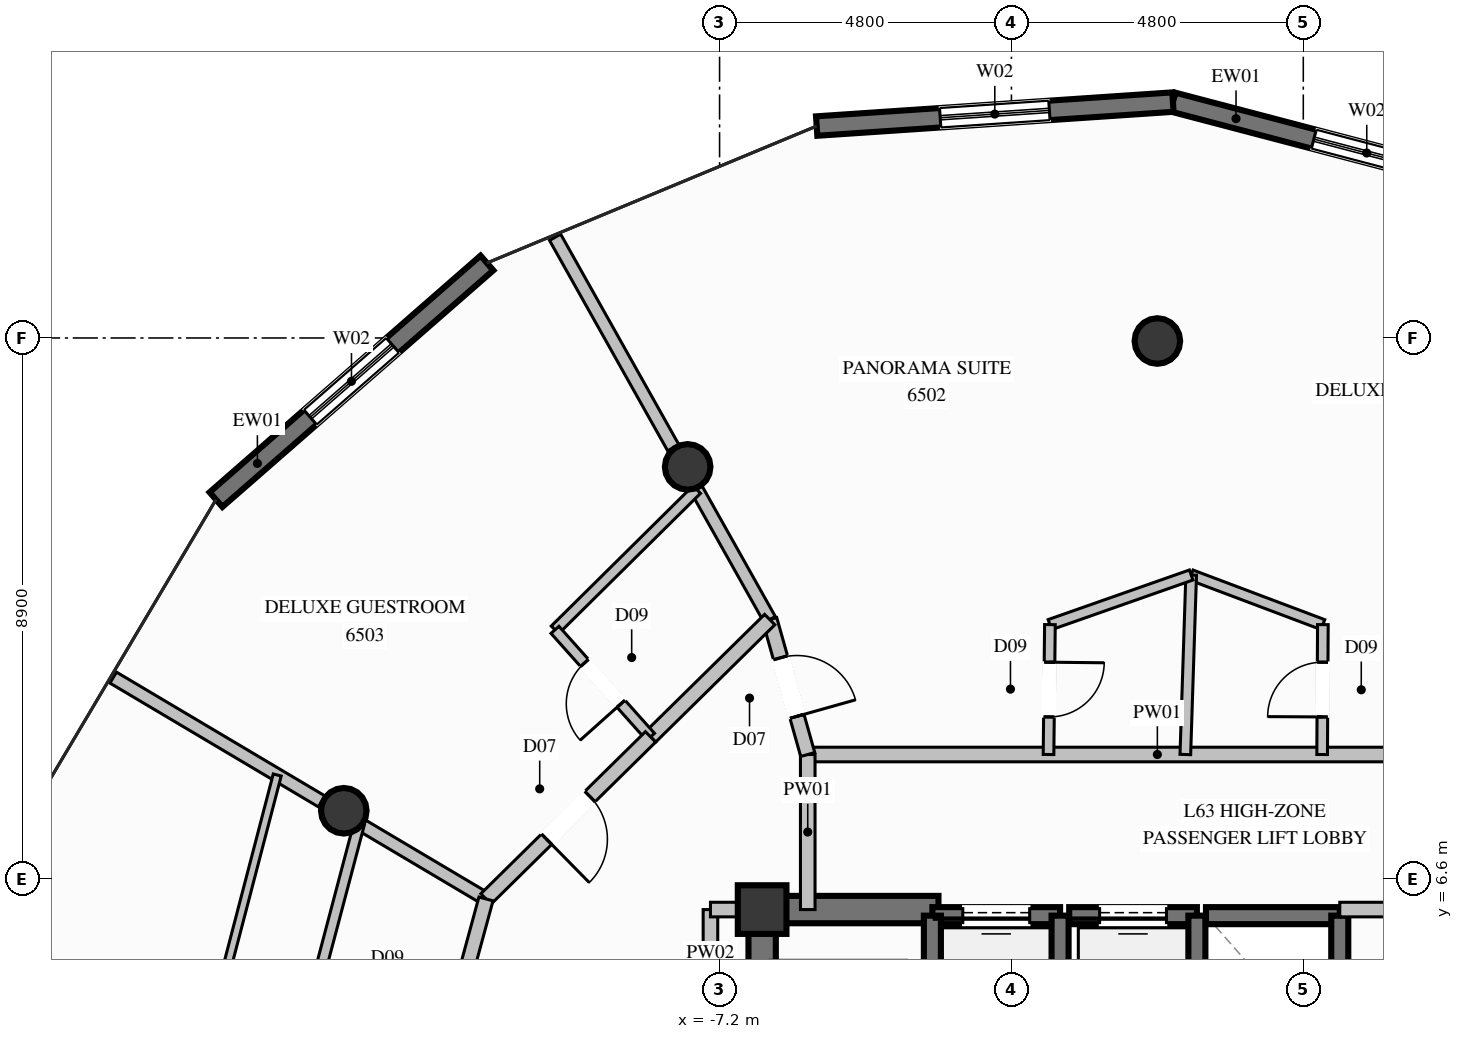
"""IFC4 building model, lengths in metres.
Left out: names, types, materials, properties, quantities, classifications, styles, units other than length and angle.
Written with IfcOpenShell. Run it as: python <this file> out.ifc"""

import sys

from ifc_helpers import new_model, si_unit, direction, frame, frame_2d, origin, origin_2d, place, context, subcontext, project, spatial, rectangle, circle, extrude, element, fill, save


model = new_model("IFC4")
c1 = context("Model", 3, precision=1e-05, world=origin(), true_north=direction((0.0, 1.0)))
c2 = subcontext(c1, "Body", "Model", "MODEL_VIEW")
j1 = project(units=[si_unit("LENGTHUNIT", "METRE"), si_unit("PLANEANGLEUNIT", "RADIAN")], contexts=[c1])
p1 = place(None, origin())
s1 = spatial("IfcSite", under=j1, at=p1, CompositionType="ELEMENT")
p2 = place(p1, origin())
s2 = spatial("IfcBuilding", under=s1, at=p2, CompositionType="ELEMENT")
p3 = place(p2, frame((0.0, 0.0, 243.0)))
s3 = spatial("IfcBuildingStorey", under=s2, at=p3, CompositionType="ELEMENT", Elevation=243.0)
p4 = place(p3, frame((-6.5, 6.1, 0.0), z_axis=(0.0, 0.0, 1.0), x_axis=(1.0, 0.0, 0.0)))
e1 = element("IfcColumn", 1, at=p4, inside=s3, PredefinedType="COLUMN", context=c2, shape_type="SweptSolid", body=[
    extrude(rectangle(XDim=0.8, YDim=0.8, at=origin_2d()), origin(), (0.0, 0.0, 1.0), 3.8),
])
p5 = place(p3, frame((-6.275, 6.1, 0.0), z_axis=(0.0, 0.0, 1.0), x_axis=(1.0, 0.0, 0.0)))
e2 = element("IfcWall", 2, at=p5, inside=s3, PredefinedType="SHEAR", context=c2, shape_type="SweptSolid", body=[
    extrude(rectangle(XDim=2.675, YDim=0.45, at=frame_2d((1.337, 0.0))), origin(), (0.0, 0.0, 1.0), 3.8),
])
p6 = place(p3, frame((-6.5, 2.35, 0.0), z_axis=(0.0, 0.0, 1.0), x_axis=(0.0, 1.0, 0.0)))
e3 = element("IfcWall", 3, at=p6, inside=s3, PredefinedType="SHEAR", context=c2, shape_type="SweptSolid", body=[
    extrude(rectangle(XDim=3.975, YDim=0.45, at=frame_2d((1.987, 0.0))), origin(), (0.0, 0.0, 1.0), 3.8),
])
for number, where, z_axis, x_axis in (
    (4, (0.0, 15.45, 0.0), (0.0, 0.0, 1.0), (1.0, 0.0, 0.0)),
    (5, (-7.725, 13.38, 0.0), (0.0, 0.0, 1.0), (1.0, 0.0, 0.0)),
    (6, (-13.38, 7.725, 0.0), (0.0, 0.0, 1.0), (1.0, 0.0, 0.0)),
):
    element("IfcColumn", number, at=place(p3, frame(where, z_axis=z_axis, x_axis=x_axis)), inside=s3, PredefinedType="COLUMN", context=c2, shape_type="SweptSolid", body=[
        extrude(circle(Radius=0.375, at=origin_2d()), origin(), (0.0, 0.0, 1.0), 3.8),
    ])
p7 = place(p3, frame((0.256, 19.379, 0.0), z_axis=(0.0, 0.0, 1.0), x_axis=(0.967181914063, -0.254084917124, 0.0)))
e7 = element("IfcWall", 7, at=p7, inside=s3, PredefinedType="SOLIDWALL", context=c2, shape_type="SweptSolid", body=[
    extrude(rectangle(XDim=5.915, YDim=0.32, at=frame_2d((2.958, 0.0))), origin(), (0.0, 0.0, 1.0), 3.57),
])
p8 = place(p7, frame((2.396, 0.0, 0.35)))
e8 = element("IfcOpeningElement", 8, at=p8, cuts=e7, PredefinedType="OPENING", context=c2, shape_type="SweptSolid", body=[
    extrude(rectangle(XDim=1.8, YDim=2.6, at=frame_2d((0.9, 1.3))), frame((0.0, 0.17, 0.0), z_axis=(0.0, -1.0, 0.0), x_axis=(1.0, 0.0, 0.0)), (0.0, 0.0, 1.0), 0.34),
])
p9 = place(p3, frame((-5.603, 18.985, 0.0), z_axis=(0.0, 0.0, 1.0), x_axis=(0.997748955427, 0.067059838539, 0.0)))
e9 = element("IfcWall", 9, at=p9, inside=s3, PredefinedType="SOLIDWALL", context=c2, shape_type="SweptSolid", body=[
    extrude(rectangle(XDim=5.872, YDim=0.32, at=frame_2d((2.936, 0.0))), origin(), (0.0, 0.0, 1.0), 3.57),
])
p10 = place(p9, frame((2.036, 0.0, 0.35)))
e10 = element("IfcOpeningElement", 10, at=p10, cuts=e9, PredefinedType="OPENING", context=c2, shape_type="SweptSolid", body=[
    extrude(rectangle(XDim=1.8, YDim=2.6, at=frame_2d((0.9, 1.3))), frame((0.0, 0.17, 0.0), z_axis=(0.0, -1.0, 0.0), x_axis=(1.0, 0.0, 0.0)), (0.0, 0.0, 1.0), 0.34),
])
p11 = place(p3, frame((-15.482, 12.842, 0.0), z_axis=(0.0, 0.0, 1.0), x_axis=(0.753261443664, 0.65772121563, 0.0)))
e11 = element("IfcWall", 11, at=p11, inside=s3, PredefinedType="SOLIDWALL", context=c2, shape_type="SweptSolid", body=[
    extrude(rectangle(XDim=5.916, YDim=0.32, at=frame_2d((2.958, 0.0))), origin(), (0.0, 0.0, 1.0), 3.57),
])
p12 = place(p11, frame((2.058, 0.0, 0.35)))
e12 = element("IfcOpeningElement", 12, at=p12, cuts=e11, PredefinedType="OPENING", context=c2, shape_type="SweptSolid", body=[
    extrude(rectangle(XDim=1.8, YDim=2.6, at=frame_2d((0.9, 1.3))), frame((0.0, 0.17, 0.0), z_axis=(0.0, -1.0, 0.0), x_axis=(1.0, 0.0, 0.0)), (0.0, 0.0, 1.0), 0.34),
])
p13 = place(p3, frame((-1.6, 6.0, 0.0), z_axis=(0.0, 0.0, 1.0), x_axis=(-1.0, 0.0, 0.0)))
e13 = element("IfcWall", 13, at=p13, inside=s3, PredefinedType="SOLIDWALL", context=c2, shape_type="SweptSolid", body=[
    extrude(rectangle(XDim=2.1, YDim=0.28, at=frame_2d((1.05, 0.0))), origin(), (0.0, 0.0, 1.0), 3.57),
])
p14 = place(p13, frame((0.5, 0.0, 0.0)))
e14 = element("IfcOpeningElement", 14, at=p14, cuts=e13, PredefinedType="OPENING", context=c2, shape_type="SweptSolid", body=[
    extrude(rectangle(XDim=1.1, YDim=2.2, at=frame_2d((0.55, 1.1))), frame((0.0, 0.15, 0.0), z_axis=(0.0, -1.0, 0.0), x_axis=(1.0, 0.0, 0.0)), (0.0, 0.0, 1.0), 0.3),
])
for number, where, z_axis, x_axis in (
    (15, (-3.7, 6.0, 0.0), (0.0, 0.0, 1.0), (0.0, -1.0, 0.0)),
    (16, (-1.6, 3.5, 0.0), (0.0, 0.0, 1.0), (0.0, 1.0, 0.0)),
):
    element("IfcWall", number, at=place(p3, frame(where, z_axis=z_axis, x_axis=x_axis)), inside=s3, PredefinedType="SOLIDWALL", context=c2, shape_type="SweptSolid", body=[
        extrude(rectangle(XDim=2.5, YDim=0.28, at=frame_2d((1.25, 0.0))), origin(), (0.0, 0.0, 1.0), 3.57),
    ])
p15 = place(p3, frame((0.65, 6.0, 0.0), z_axis=(0.0, 0.0, 1.0), x_axis=(-1.0, 0.0, 0.0)))
e17 = element("IfcWall", 17, at=p15, inside=s3, PredefinedType="SOLIDWALL", context=c2, shape_type="SweptSolid", body=[
    extrude(rectangle(XDim=2.1, YDim=0.28, at=frame_2d((1.05, 0.0))), origin(), (0.0, 0.0, 1.0), 3.57),
])
p16 = place(p15, frame((0.5, 0.0, 0.0)))
e18 = element("IfcOpeningElement", 18, at=p16, cuts=e17, PredefinedType="OPENING", context=c2, shape_type="SweptSolid", body=[
    extrude(rectangle(XDim=1.1, YDim=2.2, at=frame_2d((0.55, 1.1))), frame((0.0, 0.15, 0.0), z_axis=(0.0, -1.0, 0.0), x_axis=(1.0, 0.0, 0.0)), (0.0, 0.0, 1.0), 0.3),
])
p17 = place(p3, frame((0.65, 3.5, 0.0), z_axis=(0.0, 0.0, 1.0), x_axis=(0.0, 1.0, 0.0)))
e19 = element("IfcWall", 19, at=p17, inside=s3, PredefinedType="SOLIDWALL", context=c2, shape_type="SweptSolid", body=[
    extrude(rectangle(XDim=2.5, YDim=0.28, at=frame_2d((1.25, 0.0))), origin(), (0.0, 0.0, 1.0), 3.57),
])
p18 = place(p3, frame((3.0, 6.0, 0.0), z_axis=(0.0, 0.0, 1.0), x_axis=(-1.0, 0.0, 0.0)))
e20 = element("IfcWall", 20, at=p18, inside=s3, PredefinedType="SOLIDWALL", context=c2, shape_type="SweptSolid", body=[
    extrude(rectangle(XDim=2.2, YDim=0.28, at=frame_2d((1.1, 0.0))), origin(), (0.0, 0.0, 1.0), 3.57),
])
p19 = place(p3, frame((3.0, 3.5, 0.0), z_axis=(0.0, 0.0, 1.0), x_axis=(0.0, 1.0, 0.0)))
e21 = element("IfcWall", 21, at=p19, inside=s3, PredefinedType="SOLIDWALL", context=c2, shape_type="SweptSolid", body=[
    extrude(rectangle(XDim=2.5, YDim=0.28, at=frame_2d((1.25, 0.0))), origin(), (0.0, 0.0, 1.0), 3.57),
])
p20 = place(p3, frame((-5.75, 8.65, 0.0), z_axis=(0.0, 0.0, 1.0), x_axis=(1.0, 0.0, 0.0)))
e22 = element("IfcWall", 22, at=p20, inside=s3, PredefinedType="PARTITIONING", context=c2, shape_type="SweptSolid", body=[
    extrude(rectangle(XDim=11.5, YDim=0.24, at=frame_2d((5.75, 0.0))), origin(), (0.0, 0.0, 1.0), 3.57),
])
p21 = place(p3, frame((3.0, 6.1, 0.0), z_axis=(0.0, 0.0, 1.0), x_axis=(1.0, 0.0, 0.0)))
e23 = element("IfcWall", 23, at=p21, inside=s3, PredefinedType="PARTITIONING", context=c2, shape_type="SweptSolid", body=[
    extrude(rectangle(XDim=2.85, YDim=0.24, at=frame_2d((1.425, 0.0))), origin(), (0.0, 0.0, 1.0), 2.655),
])
p22 = place(p3, frame((-5.75, 6.1, 0.0), z_axis=(0.0, 0.0, 1.0), x_axis=(0.0, 1.0, 0.0)))
e24 = element("IfcWall", 24, at=p22, inside=s3, PredefinedType="PARTITIONING", context=c2, shape_type="SweptSolid", body=[
    extrude(rectangle(XDim=2.55, YDim=0.24, at=frame_2d((1.275, 0.0))), origin(), (0.0, 0.0, 1.0), 3.57),
])
p23 = place(p3, frame((-7.35, 4.95, 0.0), z_axis=(0.0, 0.0, 1.0), x_axis=(0.0, 1.0, 0.0)))
e25 = element("IfcWall", 25, at=p23, inside=s3, PredefinedType="PARTITIONING", context=c2, shape_type="SweptSolid", body=[
    extrude(rectangle(XDim=1.15, YDim=0.24, at=frame_2d((0.575, 0.0))), origin(), (0.0, 0.0, 1.0), 2.655),
])
p24 = place(p3, frame((-7.35, 6.1, 0.0), z_axis=(0.0, 0.0, 1.0), x_axis=(1.0, 0.0, 0.0)))
e26 = element("IfcWall", 26, at=p24, inside=s3, PredefinedType="PARTITIONING", context=c2, shape_type="SweptSolid", body=[
    extrude(rectangle(XDim=0.85, YDim=0.24, at=frame_2d((0.425, 0.0))), origin(), (0.0, 0.0, 1.0), 3.086),
])
p25 = place(p3, frame((-6.375, 10.869, 0.0), z_axis=(0.0, 0.0, 1.0), x_axis=(-0.489667191284, 0.871909422922, 0.0)))
e27 = element("IfcWall", 27, at=p25, inside=s3, PredefinedType="PARTITIONING", context=c2, shape_type="SweptSolid", body=[
    extrude(rectangle(XDim=2.459, YDim=0.21, at=frame_2d((1.229, 0.0))), origin(), (0.0, 0.0, 1.0), 3.086),
])
p26 = place(p3, frame((-7.962, 13.696, 0.0), z_axis=(0.0, 0.0, 1.0), x_axis=(-0.489665242016, 0.871910517634, 0.0)))
e28 = element("IfcWall", 28, at=p26, inside=s3, PredefinedType="PARTITIONING", context=c2, shape_type="SweptSolid", body=[
    extrude(rectangle(XDim=3.968, YDim=0.21, at=frame_2d((1.984, 0.0))), origin(), (0.0, 0.0, 1.0), 3.57),
])
p27 = place(p3, frame((-11.042, 6.275, 0.0), z_axis=(0.0, 0.0, 1.0), x_axis=(-0.859975377651, 0.510335526721, 0.0)))
e29 = element("IfcWall", 29, at=p27, inside=s3, PredefinedType="PARTITIONING", context=c2, shape_type="SweptSolid", body=[
    extrude(rectangle(XDim=2.359, YDim=0.21, at=frame_2d((1.18, 0.0))), origin(), (0.0, 0.0, 1.0), 3.086),
])
p28 = place(p3, frame((-13.744, 7.879, 0.0), z_axis=(0.0, 0.0, 1.0), x_axis=(-0.859849705024, 0.510547240488, 0.0)))
e30 = element("IfcWall", 30, at=p28, inside=s3, PredefinedType="PARTITIONING", context=c2, shape_type="SweptSolid", body=[
    extrude(rectangle(XDim=3.988, YDim=0.21, at=frame_2d((1.994, 0.0))), origin(), (0.0, 0.0, 1.0), 3.57),
])
p29 = place(p3, frame((0.556, 11.602, 0.0), z_axis=(0.0, 0.0, 1.0), x_axis=(0.935773181831, -0.35260254135, 0.0)))
e31 = element("IfcWall", 31, at=p29, inside=s3, PredefinedType="PLUMBINGWALL", context=c2, shape_type="SweptSolid", body=[
    extrude(rectangle(XDim=2.315, YDim=0.175, at=frame_2d((1.157, 0.0))), origin(), (0.0, 0.0, 1.0), 3.252),
])
p30 = place(p3, frame((0.556, 11.602, 0.0), z_axis=(0.0, 0.0, 1.0), x_axis=(-0.032483675207, -0.999472266171, 0.0)))
e32 = element("IfcWall", 32, at=p30, inside=s3, PredefinedType="PLUMBINGWALL", context=c2, shape_type="SweptSolid", body=[
    extrude(rectangle(XDim=2.954, YDim=0.175, at=frame_2d((1.477, 0.0))), origin(), (0.0, 0.0, 1.0), 3.57),
])
p31 = place(p3, frame((2.71, 8.65, 0.0), z_axis=(0.0, 0.0, 1.0), x_axis=(0.005600552237, 0.999984316784, 0.0)))
e33 = element("IfcWall", 33, at=p31, inside=s3, PredefinedType="PLUMBINGWALL", context=c2, shape_type="SweptSolid", body=[
    extrude(rectangle(XDim=2.136, YDim=0.175, at=frame_2d((1.068, 0.0))), origin(), (0.0, 0.0, 1.0), 3.57),
])
p32 = place(p31, frame((0.618, 0.0, 0.0)))
e34 = element("IfcOpeningElement", 34, at=p32, cuts=e33, PredefinedType="OPENING", context=c2, shape_type="SweptSolid", body=[
    extrude(rectangle(XDim=0.9, YDim=2.1, at=frame_2d((0.45, 1.05))), frame((0.0, 0.098, 0.0), z_axis=(0.0, -1.0, 0.0), x_axis=(1.0, 0.0, 0.0)), (0.0, 0.0, 1.0), 0.195),
])
p33 = place(p3, frame((-1.767, 10.786, 0.0), z_axis=(0.0, 0.0, 1.0), x_axis=(0.943463492061, 0.331476453385, 0.0)))
e35 = element("IfcWall", 35, at=p33, inside=s3, PredefinedType="PLUMBINGWALL", context=c2, shape_type="SweptSolid", body=[
    extrude(rectangle(XDim=2.462, YDim=0.175, at=frame_2d((1.231, 0.0))), origin(), (0.0, 0.0, 1.0), 3.252),
])
p34 = place(p3, frame((-1.767, 10.786, 0.0), z_axis=(0.0, 0.0, 1.0), x_axis=(-0.010743464968, -0.999942287315, 0.0)))
e36 = element("IfcWall", 36, at=p34, inside=s3, PredefinedType="PLUMBINGWALL", context=c2, shape_type="SweptSolid", body=[
    extrude(rectangle(XDim=2.136, YDim=0.175, at=frame_2d((1.068, 0.0))), origin(), (0.0, 0.0, 1.0), 3.57),
])
p35 = place(p34, frame((0.618, 0.0, 0.0)))
e37 = element("IfcOpeningElement", 37, at=p35, cuts=e36, PredefinedType="OPENING", context=c2, shape_type="SweptSolid", body=[
    extrude(rectangle(XDim=0.9, YDim=2.1, at=frame_2d((0.45, 1.05))), frame((0.0, 0.098, 0.0), z_axis=(0.0, -1.0, 0.0), x_axis=(1.0, 0.0, 0.0)), (0.0, 0.0, 1.0), 0.195),
])
p36 = place(p3, frame((-6.375, 10.869, 0.0), z_axis=(0.0, 0.0, 1.0), x_axis=(0.271110513922, -0.962548226969, 0.0)))
e38 = element("IfcWall", 38, at=p36, inside=s3, PredefinedType="PARTITIONING", context=c2, shape_type="SweptSolid", body=[
    extrude(rectangle(XDim=2.305, YDim=0.24, at=frame_2d((1.153, 0.0))), origin(), (0.0, 0.0, 1.0), 3.57),
])
p37 = place(p36, frame((0.653, 0.0, 0.0)))
e39 = element("IfcOpeningElement", 39, at=p37, cuts=e38, PredefinedType="OPENING", context=c2, shape_type="SweptSolid", body=[
    extrude(rectangle(XDim=1.0, YDim=2.2, at=frame_2d((0.5, 1.1))), frame((0.0, 0.13, 0.0), z_axis=(0.0, -1.0, 0.0), x_axis=(1.0, 0.0, 0.0)), (0.0, 0.0, 1.0), 0.26),
])
p38 = place(p3, frame((-6.375, 10.869, 0.0), z_axis=(0.0, 0.0, 1.0), x_axis=(-0.712721806089, -0.701446809904, 0.0)))
e40 = element("IfcWall", 40, at=p38, inside=s3, PredefinedType="PARTITIONING", context=c2, shape_type="SweptSolid", body=[
    extrude(rectangle(XDim=2.75, YDim=0.24, at=frame_2d((1.375, 0.0))), origin(), (0.0, 0.0, 1.0), 3.57),
])
p39 = place(p3, frame((-7.575, 13.007, 0.0), z_axis=(0.0, 0.0, 1.0), x_axis=(-0.710892186869, -0.703301001456, 0.0)))
e41 = element("IfcWall", 41, at=p39, inside=s3, PredefinedType="PLUMBINGWALL", context=c2, shape_type="SweptSolid", body=[
    extrude(rectangle(XDim=3.281, YDim=0.175, at=frame_2d((1.64, 0.0))), origin(), (0.0, 0.0, 1.0), 3.139),
])
p40 = place(p3, frame((-8.335, 8.94, 0.0), z_axis=(0.0, 0.0, 1.0), x_axis=(-0.666153503552, 0.745814661766, 0.0)))
e42 = element("IfcWall", 42, at=p40, inside=s3, PredefinedType="PLUMBINGWALL", context=c2, shape_type="SweptSolid", body=[
    extrude(rectangle(XDim=2.36, YDim=0.175, at=frame_2d((1.18, 0.0))), origin(), (0.0, 0.0, 1.0), 3.57),
])
p41 = place(p40, frame((0.73, 0.0, 0.0)))
e43 = element("IfcOpeningElement", 43, at=p41, cuts=e42, PredefinedType="OPENING", context=c2, shape_type="SweptSolid", body=[
    extrude(rectangle(XDim=0.9, YDim=2.1, at=frame_2d((0.45, 1.05))), frame((0.0, 0.098, 0.0), z_axis=(0.0, -1.0, 0.0), x_axis=(1.0, 0.0, 0.0)), (0.0, 0.0, 1.0), 0.195),
])
p42 = place(p3, frame((-8.335, 8.94, 0.0), z_axis=(0.0, 0.0, 1.0), x_axis=(-0.712612295011, -0.701558063883, 0.0)))
e44 = element("IfcWall", 44, at=p42, inside=s3, PredefinedType="PARTITIONING", context=c2, shape_type="SweptSolid", body=[
    extrude(rectangle(XDim=3.799, YDim=0.24, at=frame_2d((1.899, 0.0))), origin(), (0.0, 0.0, 1.0), 3.57),
])
p43 = place(p42, frame((1.399, 0.0, 0.0)))
e45 = element("IfcOpeningElement", 45, at=p43, cuts=e44, PredefinedType="OPENING", context=c2, shape_type="SweptSolid", body=[
    extrude(rectangle(XDim=1.0, YDim=2.2, at=frame_2d((0.5, 1.1))), frame((0.0, 0.13, 0.0), z_axis=(0.0, -1.0, 0.0), x_axis=(1.0, 0.0, 0.0)), (0.0, 0.0, 1.0), 0.26),
])
p44 = place(p3, frame((-11.042, 6.275, 0.0), z_axis=(0.0, 0.0, 1.0), x_axis=(-0.262572701387, -0.964912211803, 0.0)))
e46 = element("IfcWall", 46, at=p44, inside=s3, PredefinedType="PARTITIONING", context=c2, shape_type="SweptSolid", body=[
    extrude(rectangle(XDim=2.731, YDim=0.24, at=frame_2d((1.365, 0.0))), origin(), (0.0, 0.0, 1.0), 3.57),
])
p45 = place(p3, frame((-13.127, 7.513, 0.0), z_axis=(0.0, 0.0, 1.0), x_axis=(-0.25555737321, -0.966793891684, 0.0)))
e47 = element("IfcWall", 47, at=p45, inside=s3, PredefinedType="PLUMBINGWALL", context=c2, shape_type="SweptSolid", body=[
    extrude(rectangle(XDim=3.263, YDim=0.175, at=frame_2d((1.632, 0.0))), origin(), (0.0, 0.0, 1.0), 3.139),
])
p46 = place(p3, frame((-14.475, 8.313, 0.0), z_axis=(0.0, 0.0, 1.0), x_axis=(-0.252565334536, -0.967579842592, 0.0)))
e48 = element("IfcWall", 48, at=p46, inside=s3, PredefinedType="PARTITIONING", context=c2, shape_type="SweptSolid", body=[
    extrude(rectangle(XDim=8.592, YDim=0.135, at=frame_2d((4.296, 0.0))), origin(), (0.0, 0.0, 1.0), 3.57),
])
p47 = place(p46, frame((3.821, 0.0, 0.0)))
e49 = element("IfcOpeningElement", 49, at=p47, cuts=e48, PredefinedType="OPENING", context=c2, shape_type="SweptSolid", body=[
    extrude(rectangle(XDim=0.95, YDim=2.1, at=frame_2d((0.475, 1.05))), frame((0.0, 0.078, 0.0), z_axis=(0.0, -1.0, 0.0), x_axis=(1.0, 0.0, 0.0)), (0.0, 0.0, 1.0), 0.155),
])
p48 = place(p8, origin())
e50 = element("IfcWindow", 50, at=p48, inside=s3, PartitioningType="SINGLE_PANEL", PredefinedType="WINDOW", context=c2, shape_type="SweptSolid", body=[
    extrude(rectangle(XDim=1.8, YDim=2.6, at=frame_2d((0.9, 1.3))), frame((0.0, 0.03, 0.0), z_axis=(0.0, -1.0, 0.0), x_axis=(1.0, 0.0, 0.0)), (0.0, 0.0, 1.0), 0.06),
])
fill(e8, e50)
p49 = place(p10, origin())
e51 = element("IfcWindow", 51, at=p49, inside=s3, PartitioningType="SINGLE_PANEL", PredefinedType="WINDOW", context=c2, shape_type="SweptSolid", body=[
    extrude(rectangle(XDim=1.8, YDim=2.6, at=frame_2d((0.9, 1.3))), frame((0.0, 0.03, 0.0), z_axis=(0.0, -1.0, 0.0), x_axis=(1.0, 0.0, 0.0)), (0.0, 0.0, 1.0), 0.06),
])
fill(e10, e51)
p50 = place(p12, origin())
e52 = element("IfcWindow", 52, at=p50, inside=s3, PartitioningType="SINGLE_PANEL", PredefinedType="WINDOW", context=c2, shape_type="SweptSolid", body=[
    extrude(rectangle(XDim=1.8, YDim=2.6, at=frame_2d((0.9, 1.3))), frame((0.0, 0.03, 0.0), z_axis=(0.0, -1.0, 0.0), x_axis=(1.0, 0.0, 0.0)), (0.0, 0.0, 1.0), 0.06),
])
fill(e12, e52)
p51 = place(p14, origin())
e53 = element("IfcDoor", 53, at=p51, inside=s3, OperationType="SLIDING_TO_LEFT", PredefinedType="DOOR", context=c2, shape_type="SweptSolid", body=[
    extrude(rectangle(XDim=1.1, YDim=2.2, at=frame_2d((0.55, 1.1))), frame((0.0, 0.025, 0.0), z_axis=(0.0, -1.0, 0.0), x_axis=(1.0, 0.0, 0.0)), (0.0, 0.0, 1.0), 0.05),
])
fill(e14, e53)
p52 = place(p16, origin())
e54 = element("IfcDoor", 54, at=p52, inside=s3, OperationType="SLIDING_TO_LEFT", PredefinedType="DOOR", context=c2, shape_type="SweptSolid", body=[
    extrude(rectangle(XDim=1.1, YDim=2.2, at=frame_2d((0.55, 1.1))), frame((0.0, 0.025, 0.0), z_axis=(0.0, -1.0, 0.0), x_axis=(1.0, 0.0, 0.0)), (0.0, 0.0, 1.0), 0.05),
])
fill(e18, e54)
p53 = place(p32, origin())
e55 = element("IfcDoor", 55, at=p53, inside=s3, OperationType="SINGLE_SWING_LEFT", PredefinedType="DOOR", context=c2, shape_type="SweptSolid", body=[
    extrude(rectangle(XDim=0.9, YDim=2.1, at=frame_2d((0.45, 1.05))), frame((0.0, 0.025, 0.0), z_axis=(0.0, -1.0, 0.0), x_axis=(1.0, 0.0, 0.0)), (0.0, 0.0, 1.0), 0.05),
])
fill(e34, e55)
p54 = place(p35, origin())
e56 = element("IfcDoor", 56, at=p54, inside=s3, OperationType="SINGLE_SWING_LEFT", PredefinedType="DOOR", context=c2, shape_type="SweptSolid", body=[
    extrude(rectangle(XDim=0.9, YDim=2.1, at=frame_2d((0.45, 1.05))), frame((0.0, 0.025, 0.0), z_axis=(0.0, -1.0, 0.0), x_axis=(1.0, 0.0, 0.0)), (0.0, 0.0, 1.0), 0.05),
])
fill(e37, e56)
p55 = place(p37, origin())
e57 = element("IfcDoor", 57, at=p55, inside=s3, OperationType="SINGLE_SWING_RIGHT", PredefinedType="DOOR", context=c2, shape_type="SweptSolid", body=[
    extrude(rectangle(XDim=1.0, YDim=2.2, at=frame_2d((0.5, 1.1))), frame((0.0, 0.025, 0.0), z_axis=(0.0, -1.0, 0.0), x_axis=(1.0, 0.0, 0.0)), (0.0, 0.0, 1.0), 0.05),
])
fill(e39, e57)
p56 = place(p41, origin())
e58 = element("IfcDoor", 58, at=p56, inside=s3, OperationType="SINGLE_SWING_LEFT", PredefinedType="DOOR", context=c2, shape_type="SweptSolid", body=[
    extrude(rectangle(XDim=0.9, YDim=2.1, at=frame_2d((0.45, 1.05))), frame((0.0, 0.025, 0.0), z_axis=(0.0, -1.0, 0.0), x_axis=(1.0, 0.0, 0.0)), (0.0, 0.0, 1.0), 0.05),
])
fill(e43, e58)
p57 = place(p43, origin())
e59 = element("IfcDoor", 59, at=p57, inside=s3, OperationType="SINGLE_SWING_RIGHT", PredefinedType="DOOR", context=c2, shape_type="SweptSolid", body=[
    extrude(rectangle(XDim=1.0, YDim=2.2, at=frame_2d((0.5, 1.1))), frame((0.0, 0.025, 0.0), z_axis=(0.0, -1.0, 0.0), x_axis=(1.0, 0.0, 0.0)), (0.0, 0.0, 1.0), 0.05),
])
fill(e45, e59)
save(model, sys.argv[1])
